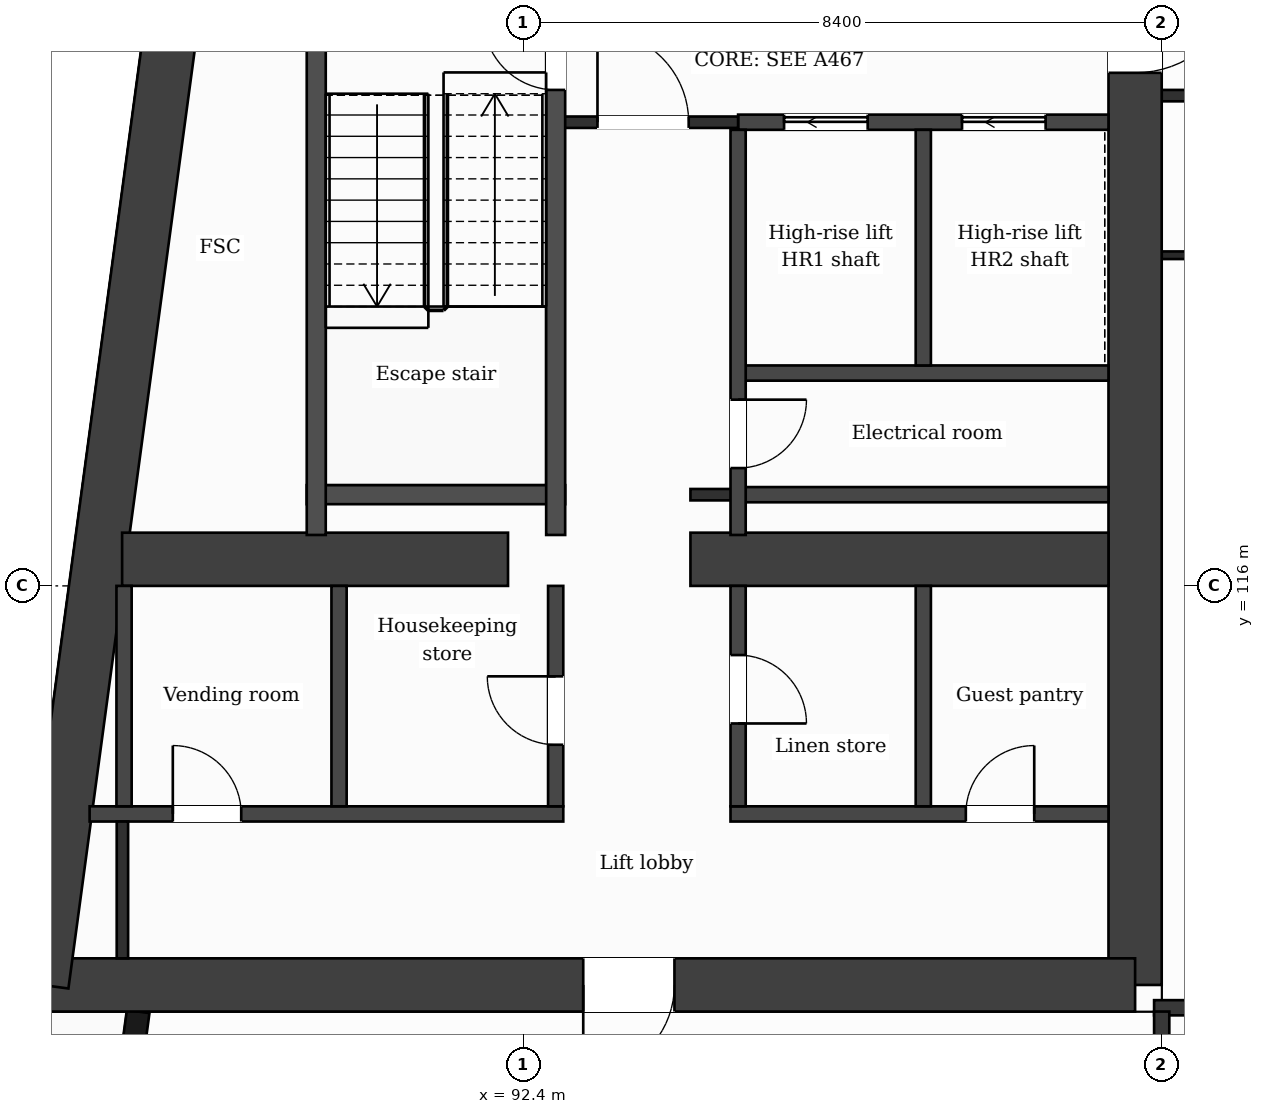
"""IFC4 building model, lengths in metres.
Left out: names, types, materials, properties, quantities, classifications, styles, units other than length and angle.
Written with IfcOpenShell. Run it as: python <this file> out.ifc"""

import sys

from ifc_helpers import new_model, si_unit, direction, frame, frame_2d, origin, place, context, subcontext, project, spatial, rectangle, extrude, element, fill, save


model = new_model("IFC4")
c1 = context("Model", 3, precision=1e-05, world=origin(), true_north=direction((0.0, 1.0)))
c2 = subcontext(c1, "Body", "Model", "MODEL_VIEW")
j1 = project(units=[si_unit("LENGTHUNIT", "METRE"), si_unit("PLANEANGLEUNIT", "RADIAN")], contexts=[c1])
p1 = place(None, origin())
s1 = spatial("IfcSite", under=j1, at=p1, CompositionType="ELEMENT")
p2 = place(p1, origin())
s2 = spatial("IfcBuilding", under=s1, at=p2, CompositionType="ELEMENT")
p3 = place(p2, frame((0.0, 0.0, 273.8)))
s3 = spatial("IfcBuildingStorey", under=s2, at=p3, CompositionType="ELEMENT", Elevation=273.8)
p4 = place(p3, frame((100.45, 132.05, 0.0), z_axis=(0.0, 0.0, 1.0), x_axis=(0.0, -1.0, 0.0)))
e1 = element("IfcWall", 1, at=p4, inside=s3, PredefinedType="SHEAR", context=c2, shape_type="SweptSolid", body=[
    extrude(rectangle(XDim=21.3, YDim=0.7, at=frame_2d((10.65, 0.0))), origin(), (0.0, 0.0, 1.0), 3.7),
])
p5 = place(p4, frame((7.9, 0.0, 0.0)))
e2 = element("IfcOpeningElement", 2, at=p5, cuts=e1, PredefinedType="OPENING", context=c2, shape_type="SweptSolid", body=[
    extrude(rectangle(XDim=1.4, YDim=2.1, at=frame_2d((0.7, 1.05))), frame((0.0, 0.36, 0.0), z_axis=(0.0, -1.0, 0.0), x_axis=(1.0, 0.0, 0.0)), (0.0, 0.0, 1.0), 0.72),
])
p6 = place(p3, frame((100.45, 110.75, 0.0), z_axis=(0.0, 0.0, 1.0), x_axis=(-1.0, 0.0, 0.0)))
e3 = element("IfcWall", 3, at=p6, inside=s3, PredefinedType="SHEAR", context=c2, shape_type="SweptSolid", body=[
    extrude(rectangle(XDim=14.38, YDim=0.7, at=frame_2d((7.19, 0.0))), origin(), (0.0, 0.0, 1.0), 3.7),
])
p7 = place(p6, frame((6.06, 0.0, 0.0)))
e4 = element("IfcOpeningElement", 4, at=p7, cuts=e3, PredefinedType="OPENING", context=c2, shape_type="SweptSolid", body=[
    extrude(rectangle(XDim=1.2, YDim=2.1, at=frame_2d((0.6, 1.05))), frame((0.0, 0.36, 0.0), z_axis=(0.0, -1.0, 0.0), x_axis=(1.0, 0.0, 0.0)), (0.0, 0.0, 1.0), 0.72),
])
p8 = place(p3, frame((86.07, 110.75, 0.0), z_axis=(0.0, 0.0, 1.0), x_axis=(0.133406218907, 0.991061441464, 0.0)))
e5 = element("IfcWall", 5, at=p8, inside=s3, PredefinedType="SHEAR", context=c2, shape_type="SweptSolid", body=[
    extrude(rectangle(XDim=21.492, YDim=0.7, at=frame_2d((10.746, 0.0))), origin(), (0.0, 0.0, 1.0), 3.7),
])
p9 = place(p3, frame((87.123, 116.35, 0.0), z_axis=(0.0, 0.0, 1.0), x_axis=(1.0, 0.0, 0.0)))
e6 = element("IfcWall", 6, at=p9, inside=s3, PredefinedType="SHEAR", context=c2, shape_type="SweptSolid", body=[
    extrude(rectangle(XDim=5.077, YDim=0.7, at=frame_2d((2.539, 0.0))), origin(), (0.0, 0.0, 1.0), 3.7),
])
p10 = place(p3, frame((94.6, 116.35, 0.0), z_axis=(0.0, 0.0, 1.0), x_axis=(1.0, 0.0, 0.0)))
e7 = element("IfcWall", 7, at=p10, inside=s3, PredefinedType="SHEAR", context=c2, shape_type="SweptSolid", body=[
    extrude(rectangle(XDim=5.5, YDim=0.7, at=frame_2d((2.75, 0.0))), origin(), (0.0, 0.0, 1.0), 3.7),
])
p11 = place(p3, frame((87.334, 110.4, 0.0), z_axis=(0.0, 0.0, 1.0), x_axis=(-0.13345962011, -0.991054251694, 0.0)))
e8 = element("IfcWall", 8, at=p11, inside=s3, PredefinedType="SOLIDWALL", context=c2, shape_type="SweptSolid", body=[
    extrude(rectangle(XDim=1.937, YDim=0.3, at=frame_2d((0.969, 0.0))), origin(), (0.0, 0.0, 1.0), 3.38),
])
p12 = place(p3, frame((100.7, 110.45, 0.0), z_axis=(0.0, 0.0, 1.0), x_axis=(1.0, 0.0, 0.0)))
e9 = element("IfcWall", 9, at=p12, inside=s3, PredefinedType="PARTITIONING", context=c2, shape_type="SweptSolid", body=[
    extrude(rectangle(XDim=25.4, YDim=0.2, at=frame_2d((12.7, 0.0))), origin(), (0.0, 0.0, 1.0), 3.38),
])
p13 = place(p3, frame((86.696, 113.0, 0.0), z_axis=(0.0, 0.0, 1.0), x_axis=(1.0, 0.0, 0.0)))
e10 = element("IfcWall", 10, at=p13, inside=s3, PredefinedType="PARTITIONING", context=c2, shape_type="SweptSolid", body=[
    extrude(rectangle(XDim=6.231, YDim=0.2, at=frame_2d((3.116, 0.0))), origin(), (0.0, 0.0, 1.0), 3.38),
])
p14 = place(p13, frame((1.094, 0.0, 0.0)))
e11 = element("IfcOpeningElement", 11, at=p14, cuts=e10, PredefinedType="OPENING", context=c2, shape_type="SweptSolid", body=[
    extrude(rectangle(XDim=0.9, YDim=2.1, at=frame_2d((0.45, 1.05))), frame((0.0, 0.11, 0.0), z_axis=(0.0, -1.0, 0.0), x_axis=(1.0, 0.0, 0.0)), (0.0, 0.0, 1.0), 0.22),
])
p15 = place(p3, frame((95.127, 113.0, 0.0), z_axis=(0.0, 0.0, 1.0), x_axis=(1.0, 0.0, 0.0)))
e12 = element("IfcWall", 12, at=p15, inside=s3, PredefinedType="PARTITIONING", context=c2, shape_type="SweptSolid", body=[
    extrude(rectangle(XDim=4.973, YDim=0.2, at=frame_2d((2.487, 0.0))), origin(), (0.0, 0.0, 1.0), 3.38),
])
p16 = place(p15, frame((3.096, 0.0, 0.0)))
e13 = element("IfcOpeningElement", 13, at=p16, cuts=e12, PredefinedType="OPENING", context=c2, shape_type="SweptSolid", body=[
    extrude(rectangle(XDim=0.9, YDim=2.1, at=frame_2d((0.45, 1.05))), frame((0.0, 0.11, 0.0), z_axis=(0.0, -1.0, 0.0), x_axis=(1.0, 0.0, 0.0)), (0.0, 0.0, 1.0), 0.22),
])
p17 = place(p3, frame((95.227, 117.2, 0.0), z_axis=(0.0, 0.0, 1.0), x_axis=(1.0, 0.0, 0.0)))
e14 = element("IfcWall", 14, at=p17, inside=s3, PredefinedType="PARTITIONING", context=c2, shape_type="SweptSolid", body=[
    extrude(rectangle(XDim=4.873, YDim=0.2, at=frame_2d((2.437, 0.0))), origin(), (0.0, 0.0, 1.0), 3.38),
])
p18 = place(p3, frame((94.6, 117.2, 0.0), z_axis=(0.0, 0.0, 1.0), x_axis=(1.0, 0.0, 0.0)))
e15 = element("IfcWall", 15, at=p18, inside=s3, PredefinedType="PARTITIONING", context=c2, shape_type="SweptSolid", body=[
    extrude(rectangle(XDim=0.627, YDim=0.15, at=frame_2d((0.313, 0.0))), origin(), (0.0, 0.0, 1.0), 3.38),
])
p19 = place(p3, frame((89.552, 117.2, 0.0), z_axis=(0.0, 0.0, 1.0), x_axis=(1.0, 0.0, 0.0)))
e16 = element("IfcWall", 16, at=p19, inside=s3, PredefinedType="PARTITIONING", context=c2, shape_type="SweptSolid", body=[
    extrude(rectangle(XDim=3.4, YDim=0.25, at=frame_2d((1.7, 0.0))), origin(), (0.0, 0.0, 1.0), 3.38),
])
p20 = place(p3, frame((95.227, 118.8, 0.0), z_axis=(0.0, 0.0, 1.0), x_axis=(1.0, 0.0, 0.0)))
e17 = element("IfcWall", 17, at=p20, inside=s3, PredefinedType="PARTITIONING", context=c2, shape_type="SweptSolid", body=[
    extrude(rectangle(XDim=4.873, YDim=0.2, at=frame_2d((2.437, 0.0))), origin(), (0.0, 0.0, 1.0), 3.38),
])
p21 = place(p3, frame((100.8, 120.35, 0.0), z_axis=(0.0, 0.0, 1.0), x_axis=(1.0, 0.0, 0.0)))
e18 = element("IfcWall", 18, at=p21, inside=s3, PredefinedType="PARTITIONING", context=c2, shape_type="SweptSolid", body=[
    extrude(rectangle(XDim=2.75, YDim=0.1, at=frame_2d((1.375, 0.0))), origin(), (0.0, 0.0, 1.0), 3.38),
])
p22 = place(p21, frame((1.07, 0.0, 0.0)))
e19 = element("IfcOpeningElement", 19, at=p22, cuts=e18, PredefinedType="OPENING", context=c2, shape_type="SweptSolid", body=[
    extrude(rectangle(XDim=0.8, YDim=2.1, at=frame_2d((0.4, 1.05))), frame((0.0, 0.06, 0.0), z_axis=(0.0, -1.0, 0.0), x_axis=(1.0, 0.0, 0.0)), (0.0, 0.0, 1.0), 0.12),
])
p23 = place(p3, frame((95.227, 122.1, 0.0), z_axis=(0.0, 0.0, 1.0), x_axis=(1.0, 0.0, 0.0)))
e20 = element("IfcWall", 20, at=p23, inside=s3, PredefinedType="PARTITIONING", context=c2, shape_type="SweptSolid", body=[
    extrude(rectangle(XDim=4.873, YDim=0.2, at=frame_2d((2.437, 0.0))), origin(), (0.0, 0.0, 1.0), 3.38),
])
p24 = place(p23, frame((0.605, 0.0, 0.0)))
e21 = element("IfcOpeningElement", 21, at=p24, cuts=e20, PredefinedType="OPENING", context=c2, shape_type="SweptSolid", body=[
    extrude(rectangle(XDim=1.1, YDim=2.1, at=frame_2d((0.55, 1.05))), frame((0.0, 0.11, 0.0), z_axis=(0.0, -1.0, 0.0), x_axis=(1.0, 0.0, 0.0)), (0.0, 0.0, 1.0), 0.22),
])
p25 = place(p23, frame((2.946, 0.0, 0.0)))
e22 = element("IfcOpeningElement", 22, at=p25, cuts=e20, PredefinedType="OPENING", context=c2, shape_type="SweptSolid", body=[
    extrude(rectangle(XDim=1.1, YDim=2.1, at=frame_2d((0.55, 1.05))), frame((0.0, 0.11, 0.0), z_axis=(0.0, -1.0, 0.0), x_axis=(1.0, 0.0, 0.0)), (0.0, 0.0, 1.0), 0.22),
])
p26 = place(p3, frame((92.827, 122.1, 0.0), z_axis=(0.0, 0.0, 1.0), x_axis=(1.0, 0.0, 0.0)))
e23 = element("IfcWall", 23, at=p26, inside=s3, PredefinedType="PARTITIONING", context=c2, shape_type="SweptSolid", body=[
    extrude(rectangle(XDim=2.4, YDim=0.15, at=frame_2d((1.2, 0.0))), origin(), (0.0, 0.0, 1.0), 3.38),
])
p27 = place(p26, frame((0.55, 0.0, 0.0)))
e24 = element("IfcOpeningElement", 24, at=p27, cuts=e23, PredefinedType="OPENING", context=c2, shape_type="SweptSolid", body=[
    extrude(rectangle(XDim=1.2, YDim=2.1, at=frame_2d((0.6, 1.05))), frame((0.0, 0.085, 0.0), z_axis=(0.0, -1.0, 0.0), x_axis=(1.0, 0.0, 0.0)), (0.0, 0.0, 1.0), 0.17),
])
p28 = place(p3, frame((100.8, 122.45, 0.0), z_axis=(0.0, 0.0, 1.0), x_axis=(1.0, 0.0, 0.0)))
e25 = element("IfcWall", 25, at=p28, inside=s3, PredefinedType="PARTITIONING", context=c2, shape_type="SweptSolid", body=[
    extrude(rectangle(XDim=25.2, YDim=0.15, at=frame_2d((12.6, 0.0))), origin(), (0.0, 0.0, 1.0), 3.38),
])
p29 = place(p28, frame((5.55, 0.0, 0.0)))
e26 = element("IfcOpeningElement", 26, at=p29, cuts=e25, PredefinedType="OPENING", context=c2, shape_type="SweptSolid", body=[
    extrude(rectangle(XDim=1.0, YDim=2.1, at=frame_2d((0.5, 1.05))), frame((0.0, 0.085, 0.0), z_axis=(0.0, -1.0, 0.0), x_axis=(1.0, 0.0, 0.0)), (0.0, 0.0, 1.0), 0.17),
])
p30 = place(p28, frame((8.862, 0.0, 0.0)))
e27 = element("IfcOpeningElement", 27, at=p30, cuts=e25, PredefinedType="OPENING", context=c2, shape_type="SweptSolid", body=[
    extrude(rectangle(XDim=0.95, YDim=2.1, at=frame_2d((0.475, 1.05))), frame((0.0, 0.085, 0.0), z_axis=(0.0, -1.0, 0.0), x_axis=(1.0, 0.0, 0.0)), (0.0, 0.0, 1.0), 0.17),
])
p31 = place(p28, frame((15.2, 0.0, 0.0)))
e28 = element("IfcOpeningElement", 28, at=p31, cuts=e25, PredefinedType="OPENING", context=c2, shape_type="SweptSolid", body=[
    extrude(rectangle(XDim=0.95, YDim=2.1, at=frame_2d((0.475, 1.05))), frame((0.0, 0.085, 0.0), z_axis=(0.0, -1.0, 0.0), x_axis=(1.0, 0.0, 0.0)), (0.0, 0.0, 1.0), 0.17),
])
p32 = place(p28, frame((17.325, 0.0, 0.0)))
e29 = element("IfcOpeningElement", 29, at=p32, cuts=e25, PredefinedType="OPENING", context=c2, shape_type="SweptSolid", body=[
    extrude(rectangle(XDim=1.0, YDim=2.1, at=frame_2d((0.5, 1.05))), frame((0.0, 0.085, 0.0), z_axis=(0.0, -1.0, 0.0), x_axis=(1.0, 0.0, 0.0)), (0.0, 0.0, 1.0), 0.17),
])
p33 = place(p28, frame((23.862, 0.0, 0.0)))
e30 = element("IfcOpeningElement", 30, at=p33, cuts=e25, PredefinedType="OPENING", context=c2, shape_type="SweptSolid", body=[
    extrude(rectangle(XDim=0.95, YDim=2.1, at=frame_2d((0.475, 1.05))), frame((0.0, 0.085, 0.0), z_axis=(0.0, -1.0, 0.0), x_axis=(1.0, 0.0, 0.0)), (0.0, 0.0, 1.0), 0.17),
])
p34 = place(p3, frame((87.148, 113.1, 0.0), z_axis=(0.0, 0.0, 1.0), x_axis=(0.0, 1.0, 0.0)))
e31 = element("IfcWall", 31, at=p34, inside=s3, PredefinedType="PARTITIONING", context=c2, shape_type="SweptSolid", body=[
    extrude(rectangle(XDim=2.9, YDim=0.2, at=frame_2d((1.45, 0.0))), origin(), (0.0, 0.0, 1.0), 3.38),
])
p35 = place(p3, frame((87.127, 111.1, 0.0), z_axis=(0.0, 0.0, 1.0), x_axis=(0.0, 1.0, 0.0)))
e32 = element("IfcWall", 32, at=p35, inside=s3, PredefinedType="PARTITIONING", context=c2, shape_type="SweptSolid", body=[
    extrude(rectangle(XDim=1.8, YDim=0.15, at=frame_2d((0.9, 0.0))), origin(), (0.0, 0.0, 1.0), 3.38),
])
p36 = place(p3, frame((89.677, 116.67, 0.0), z_axis=(0.0, 0.0, 1.0), x_axis=(0.0, 1.0, 0.0)))
e33 = element("IfcWall", 33, at=p36, inside=s3, PredefinedType="PARTITIONING", context=c2, shape_type="SweptSolid", body=[
    extrude(rectangle(XDim=7.155, YDim=0.25, at=frame_2d((3.578, 0.0))), origin(), (0.0, 0.0, 1.0), 3.38),
])
p37 = place(p3, frame((89.977, 113.1, 0.0), z_axis=(0.0, 0.0, 1.0), x_axis=(0.0, 1.0, 0.0)))
e34 = element("IfcWall", 34, at=p37, inside=s3, PredefinedType="PARTITIONING", context=c2, shape_type="SweptSolid", body=[
    extrude(rectangle(XDim=2.9, YDim=0.2, at=frame_2d((1.45, 0.0))), origin(), (0.0, 0.0, 1.0), 3.38),
])
p38 = place(p3, frame((92.827, 113.1, 0.0), z_axis=(0.0, 0.0, 1.0), x_axis=(0.0, 1.0, 0.0)))
e35 = element("IfcWall", 35, at=p38, inside=s3, PredefinedType="PARTITIONING", context=c2, shape_type="SweptSolid", body=[
    extrude(rectangle(XDim=2.9, YDim=0.2, at=frame_2d((1.45, 0.0))), origin(), (0.0, 0.0, 1.0), 3.38),
])
p39 = place(p38, frame((0.81, 0.0, 0.0)))
e36 = element("IfcOpeningElement", 36, at=p39, cuts=e35, PredefinedType="OPENING", context=c2, shape_type="SweptSolid", body=[
    extrude(rectangle(XDim=0.9, YDim=2.1, at=frame_2d((0.45, 1.05))), frame((0.0, 0.11, 0.0), z_axis=(0.0, -1.0, 0.0), x_axis=(1.0, 0.0, 0.0)), (0.0, 0.0, 1.0), 0.22),
])
p40 = place(p3, frame((92.827, 116.67, 0.0), z_axis=(0.0, 0.0, 1.0), x_axis=(0.0, 1.0, 0.0)))
e37 = element("IfcWall", 37, at=p40, inside=s3, PredefinedType="PARTITIONING", context=c2, shape_type="SweptSolid", body=[
    extrude(rectangle(XDim=7.155, YDim=0.25, at=frame_2d((3.578, 0.0))), origin(), (0.0, 0.0, 1.0), 3.38),
])
p41 = place(p40, frame((5.855, 0.0, 0.0)))
e38 = element("IfcOpeningElement", 38, at=p41, cuts=e37, PredefinedType="OPENING", context=c2, shape_type="SweptSolid", body=[
    extrude(rectangle(XDim=0.95, YDim=2.1, at=frame_2d((0.475, 1.05))), frame((0.0, 0.135, 0.0), z_axis=(0.0, -1.0, 0.0), x_axis=(1.0, 0.0, 0.0)), (0.0, 0.0, 1.0), 0.27),
])
p42 = place(p3, frame((95.227, 113.1, 0.0), z_axis=(0.0, 0.0, 1.0), x_axis=(0.0, 1.0, 0.0)))
e39 = element("IfcWall", 39, at=p42, inside=s3, PredefinedType="PARTITIONING", context=c2, shape_type="SweptSolid", body=[
    extrude(rectangle(XDim=2.9, YDim=0.2, at=frame_2d((1.45, 0.0))), origin(), (0.0, 0.0, 1.0), 3.38),
])
p43 = place(p42, frame((1.09, 0.0, 0.0)))
e40 = element("IfcOpeningElement", 40, at=p43, cuts=e39, PredefinedType="OPENING", context=c2, shape_type="SweptSolid", body=[
    extrude(rectangle(XDim=0.9, YDim=2.1, at=frame_2d((0.45, 1.05))), frame((0.0, 0.11, 0.0), z_axis=(0.0, -1.0, 0.0), x_axis=(1.0, 0.0, 0.0)), (0.0, 0.0, 1.0), 0.22),
])
p44 = place(p3, frame((95.227, 116.67, 0.0), z_axis=(0.0, 0.0, 1.0), x_axis=(0.0, 1.0, 0.0)))
e41 = element("IfcWall", 41, at=p44, inside=s3, PredefinedType="PARTITIONING", context=c2, shape_type="SweptSolid", body=[
    extrude(rectangle(XDim=5.33, YDim=0.2, at=frame_2d((2.665, 0.0))), origin(), (0.0, 0.0, 1.0), 3.38),
])
p45 = place(p44, frame((0.88, 0.0, 0.0)))
e42 = element("IfcOpeningElement", 42, at=p45, cuts=e41, PredefinedType="OPENING", context=c2, shape_type="SweptSolid", body=[
    extrude(rectangle(XDim=0.9, YDim=2.1, at=frame_2d((0.45, 1.05))), frame((0.0, 0.11, 0.0), z_axis=(0.0, -1.0, 0.0), x_axis=(1.0, 0.0, 0.0)), (0.0, 0.0, 1.0), 0.22),
])
p46 = place(p3, frame((97.664, 113.1, 0.0), z_axis=(0.0, 0.0, 1.0), x_axis=(0.0, 1.0, 0.0)))
e43 = element("IfcWall", 43, at=p46, inside=s3, PredefinedType="PARTITIONING", context=c2, shape_type="SweptSolid", body=[
    extrude(rectangle(XDim=2.9, YDim=0.2, at=frame_2d((1.45, 0.0))), origin(), (0.0, 0.0, 1.0), 3.38),
])
p47 = place(p3, frame((97.664, 118.9, 0.0), z_axis=(0.0, 0.0, 1.0), x_axis=(0.0, 1.0, 0.0)))
e44 = element("IfcWall", 44, at=p47, inside=s3, PredefinedType="PARTITIONING", context=c2, shape_type="SweptSolid", body=[
    extrude(rectangle(XDim=3.1, YDim=0.2, at=frame_2d((1.55, 0.0))), origin(), (0.0, 0.0, 1.0), 3.38),
])
p48 = place(p3, frame((100.8, 108.79, 0.0), z_axis=(0.0, 0.0, 1.0), x_axis=(0.0, 1.0, 0.0)))
e45 = element("IfcWall", 45, at=p48, inside=s3, PredefinedType="PARTITIONING", context=c2, shape_type="SweptSolid", body=[
    extrude(rectangle(XDim=1.61, YDim=0.2, at=frame_2d((0.805, 0.0))), origin(), (0.0, 0.0, 1.0), 3.38),
])
p49 = place(p27, origin())
e46 = element("IfcDoor", 46, at=p49, inside=s3, OperationType="SINGLE_SWING_LEFT", PredefinedType="DOOR", context=c2, shape_type="SweptSolid", body=[
    extrude(rectangle(XDim=1.2, YDim=2.1, at=frame_2d((0.6, 1.05))), frame((0.0, 0.025, 0.0), z_axis=(0.0, -1.0, 0.0), x_axis=(1.0, 0.0, 0.0)), (0.0, 0.0, 1.0), 0.05),
])
fill(e24, e46)
p50 = place(p24, origin())
e47 = element("IfcDoor", 47, at=p50, inside=s3, OperationType="SLIDING_TO_LEFT", PredefinedType="DOOR", context=c2, shape_type="SweptSolid", body=[
    extrude(rectangle(XDim=1.1, YDim=2.1, at=frame_2d((0.55, 1.05))), frame((0.0, 0.025, 0.0), z_axis=(0.0, -1.0, 0.0), x_axis=(1.0, 0.0, 0.0)), (0.0, 0.0, 1.0), 0.05),
])
fill(e21, e47)
p51 = place(p25, origin())
e48 = element("IfcDoor", 48, at=p51, inside=s3, OperationType="SLIDING_TO_LEFT", PredefinedType="DOOR", context=c2, shape_type="SweptSolid", body=[
    extrude(rectangle(XDim=1.1, YDim=2.1, at=frame_2d((0.55, 1.05))), frame((0.0, 0.025, 0.0), z_axis=(0.0, -1.0, 0.0), x_axis=(1.0, 0.0, 0.0)), (0.0, 0.0, 1.0), 0.05),
])
fill(e22, e48)
p52 = place(p41, origin())
e49 = element("IfcDoor", 49, at=p52, inside=s3, OperationType="SINGLE_SWING_RIGHT", PredefinedType="DOOR", context=c2, shape_type="SweptSolid", body=[
    extrude(rectangle(XDim=0.95, YDim=2.1, at=frame_2d((0.475, 1.05))), frame((0.0, 0.025, 0.0), z_axis=(0.0, -1.0, 0.0), x_axis=(1.0, 0.0, 0.0)), (0.0, 0.0, 1.0), 0.05),
])
fill(e38, e49)
p53 = place(p45, origin())
e50 = element("IfcDoor", 50, at=p53, inside=s3, OperationType="SINGLE_SWING_RIGHT", PredefinedType="DOOR", context=c2, shape_type="SweptSolid", body=[
    extrude(rectangle(XDim=0.9, YDim=2.1, at=frame_2d((0.45, 1.05))), frame((0.0, 0.025, 0.0), z_axis=(0.0, -1.0, 0.0), x_axis=(1.0, 0.0, 0.0)), (0.0, 0.0, 1.0), 0.05),
])
fill(e42, e50)
p54 = place(p14, origin())
e51 = element("IfcDoor", 51, at=p54, inside=s3, OperationType="SINGLE_SWING_LEFT", PredefinedType="DOOR", context=c2, shape_type="SweptSolid", body=[
    extrude(rectangle(XDim=0.9, YDim=2.1, at=frame_2d((0.45, 1.05))), frame((0.0, 0.025, 0.0), z_axis=(0.0, -1.0, 0.0), x_axis=(1.0, 0.0, 0.0)), (0.0, 0.0, 1.0), 0.05),
])
fill(e11, e51)
p55 = place(p39, origin())
e52 = element("IfcDoor", 52, at=p55, inside=s3, OperationType="SINGLE_SWING_RIGHT", PredefinedType="DOOR", context=c2, shape_type="SweptSolid", body=[
    extrude(rectangle(XDim=0.9, YDim=2.1, at=frame_2d((0.45, 1.05))), frame((0.0, 0.025, 0.0), z_axis=(0.0, -1.0, 0.0), x_axis=(1.0, 0.0, 0.0)), (0.0, 0.0, 1.0), 0.05),
])
fill(e36, e52)
p56 = place(p43, origin())
e53 = element("IfcDoor", 53, at=p56, inside=s3, OperationType="SINGLE_SWING_LEFT", PredefinedType="DOOR", context=c2, shape_type="SweptSolid", body=[
    extrude(rectangle(XDim=0.9, YDim=2.1, at=frame_2d((0.45, 1.05))), frame((0.0, 0.025, 0.0), z_axis=(0.0, -1.0, 0.0), x_axis=(1.0, 0.0, 0.0)), (0.0, 0.0, 1.0), 0.05),
])
fill(e40, e53)
p57 = place(p16, origin())
e54 = element("IfcDoor", 54, at=p57, inside=s3, OperationType="SINGLE_SWING_RIGHT", PredefinedType="DOOR", context=c2, shape_type="SweptSolid", body=[
    extrude(rectangle(XDim=0.9, YDim=2.1, at=frame_2d((0.45, 1.05))), frame((0.0, 0.025, 0.0), z_axis=(0.0, -1.0, 0.0), x_axis=(1.0, 0.0, 0.0)), (0.0, 0.0, 1.0), 0.05),
])
fill(e13, e54)
p58 = place(p7, origin())
e55 = element("IfcDoor", 55, at=p58, inside=s3, OperationType="SINGLE_SWING_RIGHT", PredefinedType="DOOR", context=c2, shape_type="SweptSolid", body=[
    extrude(rectangle(XDim=1.2, YDim=2.1, at=frame_2d((0.6, 1.05))), frame((0.0, 0.025, 0.0), z_axis=(0.0, -1.0, 0.0), x_axis=(1.0, 0.0, 0.0)), (0.0, 0.0, 1.0), 0.05),
])
fill(e4, e55)
p59 = place(p5, origin())
e56 = element("IfcDoor", 56, at=p59, inside=s3, OperationType="SINGLE_SWING_LEFT", PredefinedType="DOOR", context=c2, shape_type="SweptSolid", body=[
    extrude(rectangle(XDim=1.4, YDim=2.1, at=frame_2d((0.7, 1.05))), frame((0.0, 0.025, 0.0), z_axis=(0.0, -1.0, 0.0), x_axis=(1.0, 0.0, 0.0)), (0.0, 0.0, 1.0), 0.05),
])
fill(e2, e56)
save(model, sys.argv[1])
